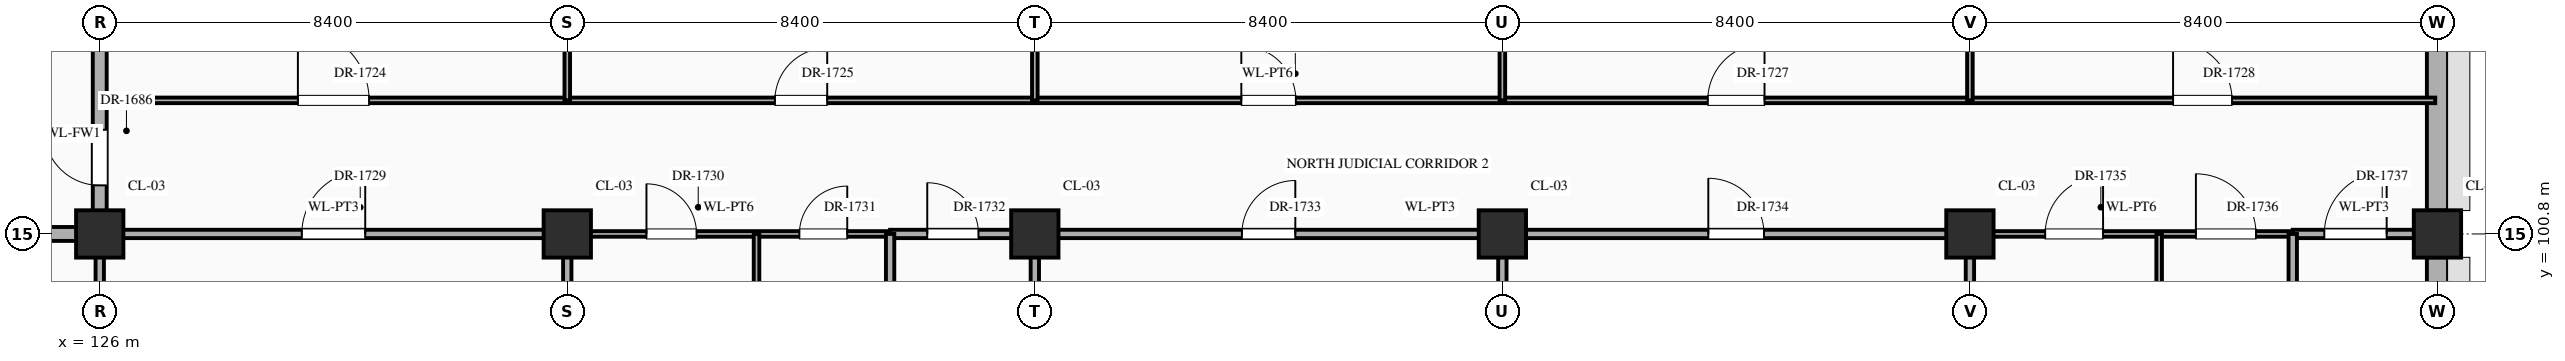
"""IFC4 building model, lengths in metres.
Left out: names, types, materials, properties, quantities, classifications, styles, units other than length and angle.
Written with IfcOpenShell. Run it as: python <this file> out.ifc"""

import sys

from ifc_helpers import new_model, si_unit, direction, frame, frame_2d, origin, origin_2d, place, context, subcontext, project, spatial, rectangle, extrude, element, fill, save


model = new_model("IFC4")
c1 = context("Model", 3, precision=1e-05, world=origin(), true_north=direction((0.0, 1.0)))
c2 = subcontext(c1, "Body", "Model", "MODEL_VIEW")
j1 = project(units=[si_unit("LENGTHUNIT", "METRE"), si_unit("PLANEANGLEUNIT", "RADIAN")], contexts=[c1])
p1 = place(None, origin())
s1 = spatial("IfcSite", under=j1, at=p1, CompositionType="ELEMENT")
p2 = place(p1, origin())
s2 = spatial("IfcBuilding", under=s1, at=p2, CompositionType="ELEMENT")
p3 = place(p2, frame((0.0, 0.0, 16.2)))
s3 = spatial("IfcBuildingStorey", under=s2, at=p3, CompositionType="ELEMENT", Elevation=16.2)
for number, where, z_axis, x_axis in (
    (1, (126.0, 100.8, 0.0), (0.0, 0.0, 1.0), (1.0, 0.0, 0.0)),
    (2, (134.4, 100.8, 0.0), (0.0, 0.0, 1.0), (1.0, 0.0, 0.0)),
    (3, (142.8, 100.8, 0.0), (0.0, 0.0, 1.0), (1.0, 0.0, 0.0)),
    (4, (151.2, 100.8, 0.0), (0.0, 0.0, 1.0), (1.0, 0.0, 0.0)),
    (5, (159.6, 100.8, 0.0), (0.0, 0.0, 1.0), (1.0, 0.0, 0.0)),
    (6, (168.0, 100.8, 0.0), (0.0, 0.0, 1.0), (1.0, 0.0, 0.0)),
):
    element("IfcColumn", number, at=place(p3, frame(where, z_axis=z_axis, x_axis=x_axis)), inside=s3, PredefinedType="COLUMN", context=c2, shape_type="SweptSolid", body=[
        extrude(rectangle(XDim=0.85, YDim=0.85, at=origin_2d()), origin(), (0.0, 0.0, 1.0), 5.4),
    ])
p4 = place(p3, frame((168.0, 94.02, 0.0), z_axis=(0.0, 0.0, 1.0), x_axis=(0.0, 1.0, 0.0)))
e7 = element("IfcWall", 7, at=p4, inside=s3, PredefinedType="STANDARD", context=c2, shape_type="SweptSolid", body=[
    extrude(rectangle(XDim=6.36, YDim=0.38, at=frame_2d((3.18, 0.0))), origin(), (0.0, 0.0, 1.0), 4.55),
])
p5 = place(p4, frame((3.805, 0.0, 0.85)))
e8 = element("IfcOpeningElement", 8, at=p5, cuts=e7, PredefinedType="OPENING", context=c2, shape_type="SweptSolid", body=[
    extrude(rectangle(XDim=1.35, YDim=2.12, at=frame_2d((0.675, 1.06))), frame((0.0, 0.202, 0.0), z_axis=(0.0, -1.0, 0.0), x_axis=(1.0, 0.0, 0.0)), (0.0, 0.0, 1.0), 0.404),
])
p6 = place(p3, frame((168.0, 101.22, 0.0), z_axis=(0.0, 0.0, 1.0), x_axis=(0.0, 1.0, 0.0)))
e9 = element("IfcWall", 9, at=p6, inside=s3, PredefinedType="STANDARD", context=c2, shape_type="SweptSolid", body=[
    extrude(rectangle(XDim=6.36, YDim=0.38, at=frame_2d((3.18, 0.0))), origin(), (0.0, 0.0, 1.0), 4.55),
])
p7 = place(p6, frame((3.705, 0.0, 0.85)))
e10 = element("IfcOpeningElement", 10, at=p7, cuts=e9, PredefinedType="OPENING", context=c2, shape_type="SweptSolid", body=[
    extrude(rectangle(XDim=1.55, YDim=1.2, at=frame_2d((0.775, 0.6))), frame((0.0, 0.202, 0.0), z_axis=(0.0, -1.0, 0.0), x_axis=(1.0, 0.0, 0.0)), (0.0, 0.0, 1.0), 0.404),
])
p8 = place(p3, frame((121.8, 100.8, 0.0), z_axis=(0.0, 0.0, 1.0), x_axis=(1.0, 0.0, 0.0)))
e11 = element("IfcWall", 11, at=p8, inside=s3, PredefinedType="STANDARD", context=c2, shape_type="SweptSolid", body=[
    extrude(rectangle(XDim=4.2, YDim=0.25, at=frame_2d((2.1, 0.0))), origin(), (0.0, 0.0, 1.0), 4.27),
])
p9 = place(p3, frame((126.0, 100.8, 0.0), z_axis=(0.0, 0.0, 1.0), x_axis=(1.0, 0.0, 0.0)))
e12 = element("IfcWall", 12, at=p9, inside=s3, PredefinedType="STANDARD", context=c2, shape_type="SweptSolid", body=[
    extrude(rectangle(XDim=8.4, YDim=0.15, at=frame_2d((4.2, 0.0))), origin(), (0.0, 0.0, 1.0), 4.27),
])
p10 = place(p9, frame((3.63, 0.0, 0.0)))
e13 = element("IfcOpeningElement", 13, at=p10, cuts=e12, PredefinedType="OPENING", context=c2, shape_type="SweptSolid", body=[
    extrude(rectangle(XDim=1.14, YDim=2.4, at=frame_2d((0.57, 1.2))), frame((0.0, 0.087, 0.0), z_axis=(0.0, -1.0, 0.0), x_axis=(1.0, 0.0, 0.0)), (0.0, 0.0, 1.0), 0.174),
])
p11 = place(p3, frame((134.4, 100.8, 0.0), z_axis=(0.0, 0.0, 1.0), x_axis=(1.0, 0.0, 0.0)))
e14 = element("IfcWall", 14, at=p11, inside=s3, PredefinedType="STANDARD", context=c2, shape_type="SweptSolid", body=[
    extrude(rectangle(XDim=5.8, YDim=0.1, at=frame_2d((2.9, 0.0))), origin(), (0.0, 0.0, 1.0), 4.27),
])
p12 = place(p11, frame((1.423, 0.0, 0.0)))
e15 = element("IfcOpeningElement", 15, at=p12, cuts=e14, PredefinedType="OPENING", context=c2, shape_type="SweptSolid", body=[
    extrude(rectangle(XDim=0.9, YDim=2.15, at=frame_2d((0.45, 1.075))), frame((0.0, 0.062, 0.0), z_axis=(0.0, -1.0, 0.0), x_axis=(1.0, 0.0, 0.0)), (0.0, 0.0, 1.0), 0.124),
])
p13 = place(p11, frame((4.17, 0.0, 0.0)))
e16 = element("IfcOpeningElement", 16, at=p13, cuts=e14, PredefinedType="OPENING", context=c2, shape_type="SweptSolid", body=[
    extrude(rectangle(XDim=0.86, YDim=2.1, at=frame_2d((0.43, 1.05))), frame((0.0, 0.062, 0.0), z_axis=(0.0, -1.0, 0.0), x_axis=(1.0, 0.0, 0.0)), (0.0, 0.0, 1.0), 0.124),
])
p14 = place(p3, frame((140.2, 100.8, 0.0), z_axis=(0.0, 0.0, 1.0), x_axis=(1.0, 0.0, 0.0)))
e17 = element("IfcWall", 17, at=p14, inside=s3, PredefinedType="STANDARD", context=c2, shape_type="SweptSolid", body=[
    extrude(rectangle(XDim=19.4, YDim=0.15, at=frame_2d((9.7, 0.0))), origin(), (0.0, 0.0, 1.0), 4.2),
])
p15 = place(p14, frame((0.667, 0.0, 0.0)))
e18 = element("IfcOpeningElement", 18, at=p15, cuts=e17, PredefinedType="OPENING", context=c2, shape_type="SweptSolid", body=[
    extrude(rectangle(XDim=0.92, YDim=2.15, at=frame_2d((0.46, 1.075))), frame((0.0, 0.087, 0.0), z_axis=(0.0, -1.0, 0.0), x_axis=(1.0, 0.0, 0.0)), (0.0, 0.0, 1.0), 0.174),
])
p16 = place(p14, frame((6.32, 0.0, 0.0)))
e19 = element("IfcOpeningElement", 19, at=p16, cuts=e17, PredefinedType="OPENING", context=c2, shape_type="SweptSolid", body=[
    extrude(rectangle(XDim=0.96, YDim=2.2, at=frame_2d((0.48, 1.1))), frame((0.0, 0.087, 0.0), z_axis=(0.0, -1.0, 0.0), x_axis=(1.0, 0.0, 0.0)), (0.0, 0.0, 1.0), 0.174),
])
p17 = place(p14, frame((14.7, 0.0, 0.0)))
e20 = element("IfcOpeningElement", 20, at=p17, cuts=e17, PredefinedType="OPENING", context=c2, shape_type="SweptSolid", body=[
    extrude(rectangle(XDim=1.0, YDim=2.25, at=frame_2d((0.5, 1.125))), frame((0.0, 0.087, 0.0), z_axis=(0.0, -1.0, 0.0), x_axis=(1.0, 0.0, 0.0)), (0.0, 0.0, 1.0), 0.174),
])
p18 = place(p3, frame((159.6, 100.8, 0.0), z_axis=(0.0, 0.0, 1.0), x_axis=(1.0, 0.0, 0.0)))
e21 = element("IfcWall", 21, at=p18, inside=s3, PredefinedType="STANDARD", context=c2, shape_type="SweptSolid", body=[
    extrude(rectangle(XDim=5.8, YDim=0.1, at=frame_2d((2.9, 0.0))), origin(), (0.0, 0.0, 1.0), 4.35),
])
p19 = place(p18, frame((1.353, 0.0, 0.0)))
e22 = element("IfcOpeningElement", 22, at=p19, cuts=e21, PredefinedType="OPENING", context=c2, shape_type="SweptSolid", body=[
    extrude(rectangle(XDim=1.04, YDim=2.2, at=frame_2d((0.52, 1.1))), frame((0.0, 0.062, 0.0), z_axis=(0.0, -1.0, 0.0), x_axis=(1.0, 0.0, 0.0)), (0.0, 0.0, 1.0), 0.124),
])
p20 = place(p18, frame((4.06, 0.0, 0.0)))
e23 = element("IfcOpeningElement", 23, at=p20, cuts=e21, PredefinedType="OPENING", context=c2, shape_type="SweptSolid", body=[
    extrude(rectangle(XDim=1.08, YDim=2.25, at=frame_2d((0.54, 1.125))), frame((0.0, 0.062, 0.0), z_axis=(0.0, -1.0, 0.0), x_axis=(1.0, 0.0, 0.0)), (0.0, 0.0, 1.0), 0.124),
])
p21 = place(p3, frame((165.4, 100.8, 0.0), z_axis=(0.0, 0.0, 1.0), x_axis=(1.0, 0.0, 0.0)))
e24 = element("IfcWall", 24, at=p21, inside=s3, PredefinedType="STANDARD", context=c2, shape_type="SweptSolid", body=[
    extrude(rectangle(XDim=2.56, YDim=0.15, at=frame_2d((1.28, 0.0))), origin(), (0.0, 0.0, 1.0), 4.35),
])
p22 = place(p21, frame((0.567, 0.0, 0.0)))
e25 = element("IfcOpeningElement", 25, at=p22, cuts=e24, PredefinedType="OPENING", context=c2, shape_type="SweptSolid", body=[
    extrude(rectangle(XDim=1.12, YDim=2.25, at=frame_2d((0.56, 1.125))), frame((0.0, 0.087, 0.0), z_axis=(0.0, -1.0, 0.0), x_axis=(1.0, 0.0, 0.0)), (0.0, 0.0, 1.0), 0.174),
])
p23 = place(p3, frame((126.0, 103.2, 0.0), z_axis=(0.0, 0.0, 1.0), x_axis=(1.0, 0.0, 0.0)))
e26 = element("IfcWall", 26, at=p23, inside=s3, PredefinedType="STANDARD", context=c2, shape_type="SweptSolid", body=[
    extrude(rectangle(XDim=41.96, YDim=0.1, at=frame_2d((20.98, 0.0))), origin(), (0.0, 0.0, 1.0), 5.05),
])
p24 = place(p23, frame((3.56, 0.0, 0.0)))
e27 = element("IfcOpeningElement", 27, at=p24, cuts=e26, PredefinedType="OPENING", context=c2, shape_type="SweptSolid", body=[
    extrude(rectangle(XDim=1.28, YDim=2.35, at=frame_2d((0.64, 1.175))), frame((0.0, 0.062, 0.0), z_axis=(0.0, -1.0, 0.0), x_axis=(1.0, 0.0, 0.0)), (0.0, 0.0, 1.0), 0.124),
])
p25 = place(p23, frame((12.13, 0.0, 0.0)))
e28 = element("IfcOpeningElement", 28, at=p25, cuts=e26, PredefinedType="OPENING", context=c2, shape_type="SweptSolid", body=[
    extrude(rectangle(XDim=0.94, YDim=2.3, at=frame_2d((0.47, 1.15))), frame((0.0, 0.062, 0.0), z_axis=(0.0, -1.0, 0.0), x_axis=(1.0, 0.0, 0.0)), (0.0, 0.0, 1.0), 0.124),
])
p26 = place(p23, frame((20.51, 0.0, 0.0)))
e29 = element("IfcOpeningElement", 29, at=p26, cuts=e26, PredefinedType="OPENING", context=c2, shape_type="SweptSolid", body=[
    extrude(rectangle(XDim=0.98, YDim=2.35, at=frame_2d((0.49, 1.175))), frame((0.0, 0.062, 0.0), z_axis=(0.0, -1.0, 0.0), x_axis=(1.0, 0.0, 0.0)), (0.0, 0.0, 1.0), 0.124),
])
p27 = place(p23, frame((28.89, 0.0, 0.0)))
e30 = element("IfcOpeningElement", 30, at=p27, cuts=e26, PredefinedType="OPENING", context=c2, shape_type="SweptSolid", body=[
    extrude(rectangle(XDim=1.02, YDim=2.4, at=frame_2d((0.51, 1.2))), frame((0.0, 0.062, 0.0), z_axis=(0.0, -1.0, 0.0), x_axis=(1.0, 0.0, 0.0)), (0.0, 0.0, 1.0), 0.124),
])
p28 = place(p23, frame((37.25, 0.0, 0.0)))
e31 = element("IfcOpeningElement", 31, at=p28, cuts=e26, PredefinedType="OPENING", context=c2, shape_type="SweptSolid", body=[
    extrude(rectangle(XDim=1.06, YDim=2.4, at=frame_2d((0.53, 1.2))), frame((0.0, 0.062, 0.0), z_axis=(0.0, -1.0, 0.0), x_axis=(1.0, 0.0, 0.0)), (0.0, 0.0, 1.0), 0.124),
])
p29 = place(p3, frame((126.0, 96.0, 0.0), z_axis=(0.0, 0.0, 1.0), x_axis=(0.0, 1.0, 0.0)))
e32 = element("IfcWall", 32, at=p29, inside=s3, PredefinedType="STANDARD", context=c2, shape_type="SweptSolid", body=[
    extrude(rectangle(XDim=4.8, YDim=0.15, at=frame_2d((2.4, 0.0))), origin(), (0.0, 0.0, 1.0), 4.37),
])
p30 = place(p3, frame((126.0, 100.8, 0.0), z_axis=(0.0, 0.0, 1.0), x_axis=(0.0, 1.0, 0.0)))
e33 = element("IfcWall", 33, at=p30, inside=s3, PredefinedType="STANDARD", context=c2, shape_type="SweptSolid", body=[
    extrude(rectangle(XDim=3.6, YDim=0.25, at=frame_2d((1.8, 0.0))), origin(), (0.0, 0.0, 1.0), 4.37),
])
p31 = place(p30, frame((0.873, 0.0, 0.0)))
e34 = element("IfcOpeningElement", 34, at=p31, cuts=e33, PredefinedType="OPENING", context=c2, shape_type="SweptSolid", body=[
    extrude(rectangle(XDim=1.0, YDim=2.2, at=frame_2d((0.5, 1.1))), frame((0.0, 0.137, 0.0), z_axis=(0.0, -1.0, 0.0), x_axis=(1.0, 0.0, 0.0)), (0.0, 0.0, 1.0), 0.274),
])
p32 = place(p3, frame((134.4, 96.0, 0.0), z_axis=(0.0, 0.0, 1.0), x_axis=(0.0, 1.0, 0.0)))
e35 = element("IfcWall", 35, at=p32, inside=s3, PredefinedType="STANDARD", context=c2, shape_type="SweptSolid", body=[
    extrude(rectangle(XDim=4.8, YDim=0.15, at=frame_2d((2.4, 0.0))), origin(), (0.0, 0.0, 1.0), 4.37),
])
p33 = place(p3, frame((134.4, 103.2, 0.0), z_axis=(0.0, 0.0, 1.0), x_axis=(0.0, 1.0, 0.0)))
e36 = element("IfcWall", 36, at=p33, inside=s3, PredefinedType="STANDARD", context=c2, shape_type="SweptSolid", body=[
    extrude(rectangle(XDim=4.76, YDim=0.1, at=frame_2d((2.38, 0.0))), origin(), (0.0, 0.0, 1.0), 4.37),
])
p34 = place(p3, frame((137.8, 96.0, 0.0), z_axis=(0.0, 0.0, 1.0), x_axis=(0.0, 1.0, 0.0)))
e37 = element("IfcWall", 37, at=p34, inside=s3, PredefinedType="STANDARD", context=c2, shape_type="SweptSolid", body=[
    extrude(rectangle(XDim=4.8, YDim=0.1, at=frame_2d((2.4, 0.0))), origin(), (0.0, 0.0, 1.0), 5.12),
])
p35 = place(p34, frame((1.95, 0.0, 0.0)))
e38 = element("IfcOpeningElement", 38, at=p35, cuts=e37, PredefinedType="OPENING", context=c2, shape_type="SweptSolid", body=[
    extrude(rectangle(XDim=0.9, YDim=2.15, at=frame_2d((0.45, 1.075))), frame((0.0, 0.062, 0.0), z_axis=(0.0, -1.0, 0.0), x_axis=(1.0, 0.0, 0.0)), (0.0, 0.0, 1.0), 0.124),
])
p36 = place(p3, frame((140.2, 96.0, 0.0), z_axis=(0.0, 0.0, 1.0), x_axis=(0.0, 1.0, 0.0)))
e39 = element("IfcWall", 39, at=p36, inside=s3, PredefinedType="STANDARD", context=c2, shape_type="SweptSolid", body=[
    extrude(rectangle(XDim=4.8, YDim=0.15, at=frame_2d((2.4, 0.0))), origin(), (0.0, 0.0, 1.0), 5.12),
])
p37 = place(p36, frame((1.97, 0.0, 0.0)))
e40 = element("IfcOpeningElement", 40, at=p37, cuts=e39, PredefinedType="OPENING", context=c2, shape_type="SweptSolid", body=[
    extrude(rectangle(XDim=0.86, YDim=2.1, at=frame_2d((0.43, 1.05))), frame((0.0, 0.087, 0.0), z_axis=(0.0, -1.0, 0.0), x_axis=(1.0, 0.0, 0.0)), (0.0, 0.0, 1.0), 0.174),
])
p38 = place(p3, frame((142.8, 96.0, 0.0), z_axis=(0.0, 0.0, 1.0), x_axis=(0.0, 1.0, 0.0)))
e41 = element("IfcWall", 41, at=p38, inside=s3, PredefinedType="STANDARD", context=c2, shape_type="SweptSolid", body=[
    extrude(rectangle(XDim=4.8, YDim=0.15, at=frame_2d((2.4, 0.0))), origin(), (0.0, 0.0, 1.0), 4.3),
])
p39 = place(p3, frame((142.8, 103.2, 0.0), z_axis=(0.0, 0.0, 1.0), x_axis=(0.0, 1.0, 0.0)))
e42 = element("IfcWall", 42, at=p39, inside=s3, PredefinedType="STANDARD", context=c2, shape_type="SweptSolid", body=[
    extrude(rectangle(XDim=4.76, YDim=0.1, at=frame_2d((2.38, 0.0))), origin(), (0.0, 0.0, 1.0), 4.3),
])
p40 = place(p3, frame((151.2, 96.0, 0.0), z_axis=(0.0, 0.0, 1.0), x_axis=(0.0, 1.0, 0.0)))
e43 = element("IfcWall", 43, at=p40, inside=s3, PredefinedType="STANDARD", context=c2, shape_type="SweptSolid", body=[
    extrude(rectangle(XDim=4.8, YDim=0.15, at=frame_2d((2.4, 0.0))), origin(), (0.0, 0.0, 1.0), 4.3),
])
p41 = place(p3, frame((151.2, 103.2, 0.0), z_axis=(0.0, 0.0, 1.0), x_axis=(0.0, 1.0, 0.0)))
e44 = element("IfcWall", 44, at=p41, inside=s3, PredefinedType="STANDARD", context=c2, shape_type="SweptSolid", body=[
    extrude(rectangle(XDim=4.76, YDim=0.1, at=frame_2d((2.38, 0.0))), origin(), (0.0, 0.0, 1.0), 4.3),
])
p42 = place(p3, frame((159.6, 96.0, 0.0), z_axis=(0.0, 0.0, 1.0), x_axis=(0.0, 1.0, 0.0)))
e45 = element("IfcWall", 45, at=p42, inside=s3, PredefinedType="STANDARD", context=c2, shape_type="SweptSolid", body=[
    extrude(rectangle(XDim=4.8, YDim=0.15, at=frame_2d((2.4, 0.0))), origin(), (0.0, 0.0, 1.0), 4.45),
])
p43 = place(p3, frame((159.6, 103.2, 0.0), z_axis=(0.0, 0.0, 1.0), x_axis=(0.0, 1.0, 0.0)))
e46 = element("IfcWall", 46, at=p43, inside=s3, PredefinedType="STANDARD", context=c2, shape_type="SweptSolid", body=[
    extrude(rectangle(XDim=4.76, YDim=0.1, at=frame_2d((2.38, 0.0))), origin(), (0.0, 0.0, 1.0), 4.45),
])
p44 = place(p3, frame((163.0, 96.0, 0.0), z_axis=(0.0, 0.0, 1.0), x_axis=(0.0, 1.0, 0.0)))
e47 = element("IfcWall", 47, at=p44, inside=s3, PredefinedType="STANDARD", context=c2, shape_type="SweptSolid", body=[
    extrude(rectangle(XDim=4.8, YDim=0.1, at=frame_2d((2.4, 0.0))), origin(), (0.0, 0.0, 1.0), 5.2),
])
p45 = place(p44, frame((1.94, 0.0, 0.0)))
e48 = element("IfcOpeningElement", 48, at=p45, cuts=e47, PredefinedType="OPENING", context=c2, shape_type="SweptSolid", body=[
    extrude(rectangle(XDim=0.92, YDim=2.15, at=frame_2d((0.46, 1.075))), frame((0.0, 0.062, 0.0), z_axis=(0.0, -1.0, 0.0), x_axis=(1.0, 0.0, 0.0)), (0.0, 0.0, 1.0), 0.124),
])
p46 = place(p3, frame((165.4, 96.0, 0.0), z_axis=(0.0, 0.0, 1.0), x_axis=(0.0, 1.0, 0.0)))
e49 = element("IfcWall", 49, at=p46, inside=s3, PredefinedType="STANDARD", context=c2, shape_type="SweptSolid", body=[
    extrude(rectangle(XDim=4.8, YDim=0.15, at=frame_2d((2.4, 0.0))), origin(), (0.0, 0.0, 1.0), 5.2),
])
p47 = place(p46, frame((1.92, 0.0, 0.0)))
e50 = element("IfcOpeningElement", 50, at=p47, cuts=e49, PredefinedType="OPENING", context=c2, shape_type="SweptSolid", body=[
    extrude(rectangle(XDim=0.96, YDim=2.2, at=frame_2d((0.48, 1.1))), frame((0.0, 0.087, 0.0), z_axis=(0.0, -1.0, 0.0), x_axis=(1.0, 0.0, 0.0)), (0.0, 0.0, 1.0), 0.174),
])
p48 = place(p31, origin())
e51 = element("IfcDoor", 51, at=p48, inside=s3, OperationType="SINGLE_SWING_RIGHT", PredefinedType="DOOR", context=c2, shape_type="SweptSolid", body=[
    extrude(rectangle(XDim=1.0, YDim=2.2, at=frame_2d((0.5, 1.1))), frame((0.0, 0.025, 0.0), z_axis=(0.0, -1.0, 0.0), x_axis=(1.0, 0.0, 0.0)), (0.0, 0.0, 1.0), 0.05),
])
fill(e34, e51)
p49 = place(p24, origin())
e52 = element("IfcDoor", 52, at=p49, inside=s3, OperationType="SINGLE_SWING_LEFT", PredefinedType="DOOR", context=c2, shape_type="SweptSolid", body=[
    extrude(rectangle(XDim=1.28, YDim=2.35, at=frame_2d((0.64, 1.175))), frame((0.0, 0.025, 0.0), z_axis=(0.0, -1.0, 0.0), x_axis=(1.0, 0.0, 0.0)), (0.0, 0.0, 1.0), 0.05),
])
fill(e27, e52)
p50 = place(p25, origin())
e53 = element("IfcDoor", 53, at=p50, inside=s3, OperationType="SINGLE_SWING_RIGHT", PredefinedType="DOOR", context=c2, shape_type="SweptSolid", body=[
    extrude(rectangle(XDim=0.94, YDim=2.3, at=frame_2d((0.47, 1.15))), frame((0.0, 0.025, 0.0), z_axis=(0.0, -1.0, 0.0), x_axis=(1.0, 0.0, 0.0)), (0.0, 0.0, 1.0), 0.05),
])
fill(e28, e53)
p51 = place(p26, origin())
e54 = element("IfcDoor", 54, at=p51, inside=s3, OperationType="SINGLE_SWING_LEFT", PredefinedType="DOOR", context=c2, shape_type="SweptSolid", body=[
    extrude(rectangle(XDim=0.98, YDim=2.35, at=frame_2d((0.49, 1.175))), frame((0.0, 0.025, 0.0), z_axis=(0.0, -1.0, 0.0), x_axis=(1.0, 0.0, 0.0)), (0.0, 0.0, 1.0), 0.05),
])
fill(e29, e54)
p52 = place(p27, origin())
e55 = element("IfcDoor", 55, at=p52, inside=s3, OperationType="SINGLE_SWING_RIGHT", PredefinedType="DOOR", context=c2, shape_type="SweptSolid", body=[
    extrude(rectangle(XDim=1.02, YDim=2.4, at=frame_2d((0.51, 1.2))), frame((0.0, 0.025, 0.0), z_axis=(0.0, -1.0, 0.0), x_axis=(1.0, 0.0, 0.0)), (0.0, 0.0, 1.0), 0.05),
])
fill(e30, e55)
p53 = place(p28, origin())
e56 = element("IfcDoor", 56, at=p53, inside=s3, OperationType="SINGLE_SWING_LEFT", PredefinedType="DOOR", context=c2, shape_type="SweptSolid", body=[
    extrude(rectangle(XDim=1.06, YDim=2.4, at=frame_2d((0.53, 1.2))), frame((0.0, 0.025, 0.0), z_axis=(0.0, -1.0, 0.0), x_axis=(1.0, 0.0, 0.0)), (0.0, 0.0, 1.0), 0.05),
])
fill(e31, e56)
p54 = place(p10, origin())
e57 = element("IfcDoor", 57, at=p54, inside=s3, OperationType="SINGLE_SWING_RIGHT", PredefinedType="DOOR", context=c2, shape_type="SweptSolid", body=[
    extrude(rectangle(XDim=1.14, YDim=2.4, at=frame_2d((0.57, 1.2))), frame((0.0, 0.025, 0.0), z_axis=(0.0, -1.0, 0.0), x_axis=(1.0, 0.0, 0.0)), (0.0, 0.0, 1.0), 0.05),
])
fill(e13, e57)
p55 = place(p12, origin())
e58 = element("IfcDoor", 58, at=p55, inside=s3, OperationType="SINGLE_SWING_LEFT", PredefinedType="DOOR", context=c2, shape_type="SweptSolid", body=[
    extrude(rectangle(XDim=0.9, YDim=2.15, at=frame_2d((0.45, 1.075))), frame((0.0, 0.025, 0.0), z_axis=(0.0, -1.0, 0.0), x_axis=(1.0, 0.0, 0.0)), (0.0, 0.0, 1.0), 0.05),
])
fill(e15, e58)
p56 = place(p13, origin())
e59 = element("IfcDoor", 59, at=p56, inside=s3, OperationType="SINGLE_SWING_RIGHT", PredefinedType="DOOR", context=c2, shape_type="SweptSolid", body=[
    extrude(rectangle(XDim=0.86, YDim=2.1, at=frame_2d((0.43, 1.05))), frame((0.0, 0.025, 0.0), z_axis=(0.0, -1.0, 0.0), x_axis=(1.0, 0.0, 0.0)), (0.0, 0.0, 1.0), 0.05),
])
fill(e16, e59)
p57 = place(p15, origin())
e60 = element("IfcDoor", 60, at=p57, inside=s3, OperationType="SINGLE_SWING_LEFT", PredefinedType="DOOR", context=c2, shape_type="SweptSolid", body=[
    extrude(rectangle(XDim=0.92, YDim=2.15, at=frame_2d((0.46, 1.075))), frame((0.0, 0.025, 0.0), z_axis=(0.0, -1.0, 0.0), x_axis=(1.0, 0.0, 0.0)), (0.0, 0.0, 1.0), 0.05),
])
fill(e18, e60)
p58 = place(p16, origin())
e61 = element("IfcDoor", 61, at=p58, inside=s3, OperationType="SINGLE_SWING_RIGHT", PredefinedType="DOOR", context=c2, shape_type="SweptSolid", body=[
    extrude(rectangle(XDim=0.96, YDim=2.2, at=frame_2d((0.48, 1.1))), frame((0.0, 0.025, 0.0), z_axis=(0.0, -1.0, 0.0), x_axis=(1.0, 0.0, 0.0)), (0.0, 0.0, 1.0), 0.05),
])
fill(e19, e61)
p59 = place(p17, origin())
e62 = element("IfcDoor", 62, at=p59, inside=s3, OperationType="SINGLE_SWING_LEFT", PredefinedType="DOOR", context=c2, shape_type="SweptSolid", body=[
    extrude(rectangle(XDim=1.0, YDim=2.25, at=frame_2d((0.5, 1.125))), frame((0.0, 0.025, 0.0), z_axis=(0.0, -1.0, 0.0), x_axis=(1.0, 0.0, 0.0)), (0.0, 0.0, 1.0), 0.05),
])
fill(e20, e62)
p60 = place(p19, origin())
e63 = element("IfcDoor", 63, at=p60, inside=s3, OperationType="SINGLE_SWING_RIGHT", PredefinedType="DOOR", context=c2, shape_type="SweptSolid", body=[
    extrude(rectangle(XDim=1.04, YDim=2.2, at=frame_2d((0.52, 1.1))), frame((0.0, 0.025, 0.0), z_axis=(0.0, -1.0, 0.0), x_axis=(1.0, 0.0, 0.0)), (0.0, 0.0, 1.0), 0.05),
])
fill(e22, e63)
p61 = place(p20, origin())
e64 = element("IfcDoor", 64, at=p61, inside=s3, OperationType="SINGLE_SWING_LEFT", PredefinedType="DOOR", context=c2, shape_type="SweptSolid", body=[
    extrude(rectangle(XDim=1.08, YDim=2.25, at=frame_2d((0.54, 1.125))), frame((0.0, 0.025, 0.0), z_axis=(0.0, -1.0, 0.0), x_axis=(1.0, 0.0, 0.0)), (0.0, 0.0, 1.0), 0.05),
])
fill(e23, e64)
p62 = place(p22, origin())
e65 = element("IfcDoor", 65, at=p62, inside=s3, OperationType="SINGLE_SWING_RIGHT", PredefinedType="DOOR", context=c2, shape_type="SweptSolid", body=[
    extrude(rectangle(XDim=1.12, YDim=2.25, at=frame_2d((0.56, 1.125))), frame((0.0, 0.025, 0.0), z_axis=(0.0, -1.0, 0.0), x_axis=(1.0, 0.0, 0.0)), (0.0, 0.0, 1.0), 0.05),
])
fill(e25, e65)
save(model, sys.argv[1])
